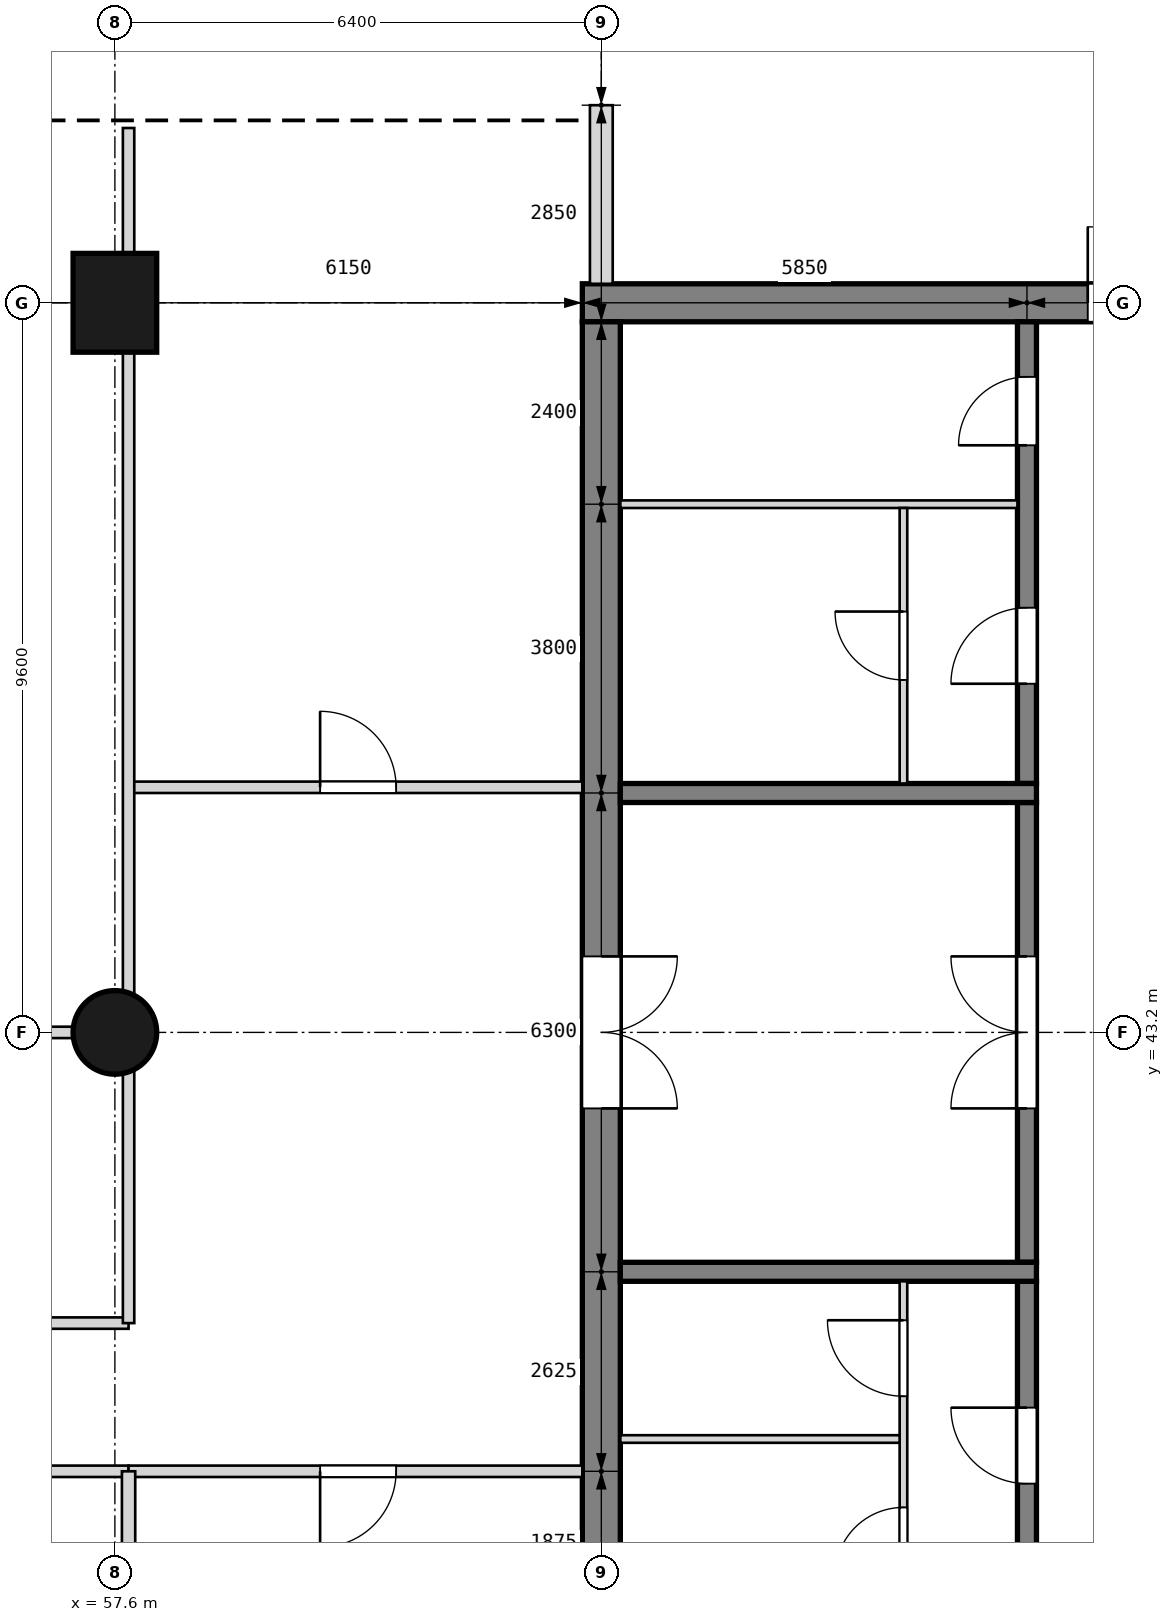
"""IFC4 building model, lengths in metres.
Left out: names, types, materials, properties, quantities, classifications, styles, units other than length and angle.
Written with IfcOpenShell. Run it as: python <this file> out.ifc"""

import sys

from ifc_helpers import new_model, si_unit, direction, frame, frame_2d, origin, origin_2d, place, context, subcontext, project, spatial, rectangle, circle, extrude, element, fill, save


model = new_model("IFC4")
c1 = context("Model", 3, precision=1e-05, world=origin(), true_north=direction((0.0, 1.0)))
c2 = subcontext(c1, "Body", "Model", "MODEL_VIEW")
j1 = project(units=[si_unit("LENGTHUNIT", "METRE"), si_unit("PLANEANGLEUNIT", "RADIAN")], contexts=[c1])
p1 = place(None, origin())
s1 = spatial("IfcSite", under=j1, at=p1, CompositionType="ELEMENT")
p2 = place(p1, origin())
s2 = spatial("IfcBuilding", under=s1, at=p2, CompositionType="ELEMENT")
p3 = place(p2, frame((0.0, 0.0, 8.4)))
s3 = spatial("IfcBuildingStorey", under=s2, at=p3, CompositionType="ELEMENT", Elevation=8.4)
p4 = place(p3, frame((63.75, 52.8, 0.0), z_axis=(0.0, 0.0, 1.0), x_axis=(1.0, 0.0, 0.0)))
e1 = element("IfcWall", 1, at=p4, inside=s3, PredefinedType="SHEAR", context=c2, shape_type="SweptSolid", body=[
    extrude(rectangle(XDim=13.3, YDim=0.5, at=frame_2d((6.65, 0.0))), origin(), (0.0, 0.0, 1.0), 4.5),
])
p5 = place(p4, frame((11.05, 0.0, 1.0)))
e2 = element("IfcOpeningElement", 2, at=p5, cuts=e1, PredefinedType="OPENING", context=c2, shape_type="SweptSolid", body=[
    extrude(rectangle(XDim=0.4, YDim=2.0, at=frame_2d((0.2, 1.0))), frame((0.0, 0.26, 0.0), z_axis=(0.0, -1.0, 0.0), x_axis=(1.0, 0.0, 0.0)), (0.0, 0.0, 1.0), 0.52),
])
p6 = place(p4, frame((6.65, 0.0, 0.0)))
e3 = element("IfcOpeningElement", 3, at=p6, cuts=e1, PredefinedType="OPENING", context=c2, shape_type="SweptSolid", body=[
    extrude(rectangle(XDim=2.0, YDim=2.1, at=frame_2d((1.0, 1.05))), frame((0.0, 0.26, 0.0), z_axis=(0.0, -1.0, 0.0), x_axis=(1.0, 0.0, 0.0)), (0.0, 0.0, 1.0), 0.52),
])
p7 = place(p3, frame((64.0, 33.85, 0.0), z_axis=(0.0, 0.0, 1.0), x_axis=(0.0, 1.0, 0.0)))
e4 = element("IfcWall", 4, at=p7, inside=s3, PredefinedType="SHEAR", context=c2, shape_type="SweptSolid", body=[
    extrude(rectangle(XDim=18.7, YDim=0.5, at=frame_2d((9.35, 0.0))), origin(), (0.0, 0.0, 1.0), 4.5),
])
p8 = place(p7, frame((8.35, 0.0, 0.0)))
e5 = element("IfcOpeningElement", 5, at=p8, cuts=e4, PredefinedType="OPENING", context=c2, shape_type="SweptSolid", body=[
    extrude(rectangle(XDim=2.0, YDim=2.1, at=frame_2d((1.0, 1.05))), frame((0.0, 0.26, 0.0), z_axis=(0.0, -1.0, 0.0), x_axis=(1.0, 0.0, 0.0)), (0.0, 0.0, 1.0), 0.52),
])
p9 = place(p3, frame((57.6, 43.2, 0.0), z_axis=(0.0, 0.0, 1.0), x_axis=(1.0, 0.0, 0.0)))
e6 = element("IfcColumn", 6, at=p9, inside=s3, PredefinedType="COLUMN", context=c2, shape_type="SweptSolid", body=[
    extrude(circle(Radius=0.55, at=origin_2d()), origin(), (0.0, 0.0, 1.0), 4.5),
])
p10 = place(p3, frame((57.6, 52.8, 0.0), z_axis=(0.0, 0.0, 1.0), x_axis=(1.0, 0.0, 0.0)))
e7 = element("IfcColumn", 7, at=p10, inside=s3, PredefinedType="COLUMN", context=c2, shape_type="SweptSolid", body=[
    extrude(rectangle(XDim=1.1, YDim=1.3, at=origin_2d()), origin(), (0.0, 0.0, 1.0), 4.5),
])
p11 = place(p3, frame((64.0, 53.05, 0.0), z_axis=(0.0, 0.0, 1.0), x_axis=(0.0, 1.0, 0.0)))
e8 = element("IfcWall", 8, at=p11, inside=s3, PredefinedType="SOLIDWALL", context=c2, shape_type="SweptSolid", body=[
    extrude(rectangle(XDim=2.35, YDim=0.3, at=frame_2d((1.175, 0.0))), origin(), (0.0, 0.0, 1.0), 3.48),
])
p12 = place(p3, frame((69.6, 33.85, 0.0), z_axis=(0.0, 0.0, 1.0), x_axis=(0.0, 1.0, 0.0)))
e9 = element("IfcWall", 9, at=p12, inside=s3, PredefinedType="SOLIDWALL", context=c2, shape_type="SweptSolid", body=[
    extrude(rectangle(XDim=6.075, YDim=0.25, at=frame_2d((3.038, 0.0))), origin(), (0.0, 0.0, 1.0), 4.2),
])
p13 = place(p12, frame((0.425, 0.0, 0.0)))
e10 = element("IfcOpeningElement", 10, at=p13, cuts=e9, PredefinedType="OPENING", context=c2, shape_type="SweptSolid", body=[
    extrude(rectangle(XDim=0.8, YDim=2.1, at=frame_2d((0.4, 1.05))), frame((0.0, 0.135, 0.0), z_axis=(0.0, -1.0, 0.0), x_axis=(1.0, 0.0, 0.0)), (0.0, 0.0, 1.0), 0.27),
])
p14 = place(p12, frame((3.413, 0.0, 0.0)))
e11 = element("IfcOpeningElement", 11, at=p14, cuts=e9, PredefinedType="OPENING", context=c2, shape_type="SweptSolid", body=[
    extrude(rectangle(XDim=1.0, YDim=2.1, at=frame_2d((0.5, 1.05))), frame((0.0, 0.135, 0.0), z_axis=(0.0, -1.0, 0.0), x_axis=(1.0, 0.0, 0.0)), (0.0, 0.0, 1.0), 0.27),
])
p15 = place(p3, frame((69.6, 40.175, 0.0), z_axis=(0.0, 0.0, 1.0), x_axis=(0.0, 1.0, 0.0)))
e12 = element("IfcWall", 12, at=p15, inside=s3, PredefinedType="SOLIDWALL", context=c2, shape_type="SweptSolid", body=[
    extrude(rectangle(XDim=6.05, YDim=0.25, at=frame_2d((3.025, 0.0))), origin(), (0.0, 0.0, 1.0), 4.2),
])
p16 = place(p15, frame((2.025, 0.0, 0.0)))
e13 = element("IfcOpeningElement", 13, at=p16, cuts=e12, PredefinedType="OPENING", context=c2, shape_type="SweptSolid", body=[
    extrude(rectangle(XDim=2.0, YDim=2.1, at=frame_2d((1.0, 1.05))), frame((0.0, 0.135, 0.0), z_axis=(0.0, -1.0, 0.0), x_axis=(1.0, 0.0, 0.0)), (0.0, 0.0, 1.0), 0.27),
])
p17 = place(p3, frame((69.6, 46.475, 0.0), z_axis=(0.0, 0.0, 1.0), x_axis=(0.0, 1.0, 0.0)))
e14 = element("IfcWall", 14, at=p17, inside=s3, PredefinedType="SOLIDWALL", context=c2, shape_type="SweptSolid", body=[
    extrude(rectangle(XDim=6.075, YDim=0.25, at=frame_2d((3.038, 0.0))), origin(), (0.0, 0.0, 1.0), 4.2),
])
p18 = place(p17, frame((1.312, 0.0, 0.0)))
e15 = element("IfcOpeningElement", 15, at=p18, cuts=e14, PredefinedType="OPENING", context=c2, shape_type="SweptSolid", body=[
    extrude(rectangle(XDim=1.0, YDim=2.1, at=frame_2d((0.5, 1.05))), frame((0.0, 0.135, 0.0), z_axis=(0.0, -1.0, 0.0), x_axis=(1.0, 0.0, 0.0)), (0.0, 0.0, 1.0), 0.27),
])
p19 = place(p17, frame((4.45, 0.0, 0.0)))
e16 = element("IfcOpeningElement", 16, at=p19, cuts=e14, PredefinedType="OPENING", context=c2, shape_type="SweptSolid", body=[
    extrude(rectangle(XDim=0.9, YDim=2.1, at=frame_2d((0.45, 1.05))), frame((0.0, 0.135, 0.0), z_axis=(0.0, -1.0, 0.0), x_axis=(1.0, 0.0, 0.0)), (0.0, 0.0, 1.0), 0.27),
])
for number, where, z_axis, x_axis in (
    (17, (69.725, 40.05, 0.0), (0.0, 0.0, 1.0), (-1.0, 0.0, 0.0)),
    (18, (69.725, 46.35, 0.0), (0.0, 0.0, 1.0), (-1.0, 0.0, 0.0)),
):
    element("IfcWall", number, at=place(p3, frame(where, z_axis=z_axis, x_axis=x_axis)), inside=s3, PredefinedType="SOLIDWALL", context=c2, shape_type="SweptSolid", body=[
        extrude(rectangle(XDim=5.475, YDim=0.25, at=frame_2d((2.738, 0.0))), origin(), (0.0, 0.0, 1.0), 4.2),
    ])
p20 = place(p3, frame((67.975, 35.6, 0.0), z_axis=(0.0, 0.0, 1.0), x_axis=(0.0, 1.0, 0.0)))
e19 = element("IfcWall", 19, at=p20, inside=s3, PredefinedType="PARTITIONING", context=c2, shape_type="SweptSolid", body=[
    extrude(rectangle(XDim=4.325, YDim=0.1, at=frame_2d((2.163, 0.0))), origin(), (0.0, 0.0, 1.0), 4.2),
])
p21 = place(p20, frame((0.45, 0.0, 0.0)))
e20 = element("IfcOpeningElement", 20, at=p21, cuts=e19, PredefinedType="OPENING", context=c2, shape_type="SweptSolid", body=[
    extrude(rectangle(XDim=0.9, YDim=2.1, at=frame_2d((0.45, 1.05))), frame((0.0, 0.06, 0.0), z_axis=(0.0, -1.0, 0.0), x_axis=(1.0, 0.0, 0.0)), (0.0, 0.0, 1.0), 0.12),
])
p22 = place(p20, frame((2.812, 0.0, 0.0)))
e21 = element("IfcOpeningElement", 21, at=p22, cuts=e19, PredefinedType="OPENING", context=c2, shape_type="SweptSolid", body=[
    extrude(rectangle(XDim=1.0, YDim=2.1, at=frame_2d((0.5, 1.05))), frame((0.0, 0.06, 0.0), z_axis=(0.0, -1.0, 0.0), x_axis=(1.0, 0.0, 0.0)), (0.0, 0.0, 1.0), 0.12),
])
p23 = place(p3, frame((67.925, 37.85, 0.0), z_axis=(0.0, 0.0, 1.0), x_axis=(-1.0, 0.0, 0.0)))
e22 = element("IfcWall", 22, at=p23, inside=s3, PredefinedType="PARTITIONING", context=c2, shape_type="SweptSolid", body=[
    extrude(rectangle(XDim=3.675, YDim=0.1, at=frame_2d((1.837, 0.0))), origin(), (0.0, 0.0, 1.0), 4.2),
])
p24 = place(p3, frame((69.475, 50.15, 0.0), z_axis=(0.0, 0.0, 1.0), x_axis=(-1.0, 0.0, 0.0)))
e23 = element("IfcWall", 23, at=p24, inside=s3, PredefinedType="PARTITIONING", context=c2, shape_type="SweptSolid", body=[
    extrude(rectangle(XDim=5.225, YDim=0.1, at=frame_2d((2.613, 0.0))), origin(), (0.0, 0.0, 1.0), 4.2),
])
p25 = place(p3, frame((67.975, 46.475, 0.0), z_axis=(0.0, 0.0, 1.0), x_axis=(0.0, 1.0, 0.0)))
e24 = element("IfcWall", 24, at=p25, inside=s3, PredefinedType="PARTITIONING", context=c2, shape_type="SweptSolid", body=[
    extrude(rectangle(XDim=3.625, YDim=0.1, at=frame_2d((1.812, 0.0))), origin(), (0.0, 0.0, 1.0), 4.2),
])
p26 = place(p25, frame((1.363, 0.0, 0.0)))
e25 = element("IfcOpeningElement", 25, at=p26, cuts=e24, PredefinedType="OPENING", context=c2, shape_type="SweptSolid", body=[
    extrude(rectangle(XDim=0.9, YDim=2.1, at=frame_2d((0.45, 1.05))), frame((0.0, 0.06, 0.0), z_axis=(0.0, -1.0, 0.0), x_axis=(1.0, 0.0, 0.0)), (0.0, 0.0, 1.0), 0.12),
])
p27 = place(p3, frame((51.38, 37.425, 0.0), z_axis=(0.0, 0.0, 1.0), x_axis=(1.0, 0.0, 0.0)))
e26 = element("IfcWall", 26, at=p27, inside=s3, PredefinedType="PARTITIONING", context=c2, shape_type="SweptSolid", body=[
    extrude(rectangle(XDim=6.4, YDim=0.15, at=frame_2d((3.2, 0.0))), origin(), (0.0, 0.0, 1.0), 4.28),
])
p28 = place(p27, frame((2.72, 0.0, 0.0)))
e27 = element("IfcOpeningElement", 27, at=p28, cuts=e26, PredefinedType="OPENING", context=c2, shape_type="SweptSolid", body=[
    extrude(rectangle(XDim=1.0, YDim=2.1, at=frame_2d((0.5, 1.05))), frame((0.0, 0.085, 0.0), z_axis=(0.0, -1.0, 0.0), x_axis=(1.0, 0.0, 0.0)), (0.0, 0.0, 1.0), 0.17),
])
p29 = place(p3, frame((57.78, 37.425, 0.0), z_axis=(0.0, 0.0, 1.0), x_axis=(1.0, 0.0, 0.0)))
e28 = element("IfcWall", 28, at=p29, inside=s3, PredefinedType="PARTITIONING", context=c2, shape_type="SweptSolid", body=[
    extrude(rectangle(XDim=5.97, YDim=0.15, at=frame_2d((2.985, 0.0))), origin(), (0.0, 0.0, 1.0), 4.28),
])
p30 = place(p29, frame((2.52, 0.0, 0.0)))
e29 = element("IfcOpeningElement", 29, at=p30, cuts=e28, PredefinedType="OPENING", context=c2, shape_type="SweptSolid", body=[
    extrude(rectangle(XDim=1.0, YDim=2.1, at=frame_2d((0.5, 1.05))), frame((0.0, 0.085, 0.0), z_axis=(0.0, -1.0, 0.0), x_axis=(1.0, 0.0, 0.0)), (0.0, 0.0, 1.0), 0.17),
])
p31 = place(p3, frame((57.78, 34.23, 0.0), z_axis=(0.0, 0.0, 1.0), x_axis=(0.0, 1.0, 0.0)))
e30 = element("IfcWall", 30, at=p31, inside=s3, PredefinedType="PARTITIONING", context=c2, shape_type="SweptSolid", body=[
    extrude(rectangle(XDim=3.195, YDim=0.175, at=frame_2d((1.598, 0.0))), origin(), (0.0, 0.0, 1.0), 3.38),
])
p32 = place(p3, frame((31.82, 39.375, 0.0), z_axis=(0.0, 0.0, 1.0), x_axis=(1.0, 0.0, 0.0)))
e31 = element("IfcWall", 31, at=p32, inside=s3, PredefinedType="PARTITIONING", context=c2, shape_type="SweptSolid", body=[
    extrude(rectangle(XDim=25.96, YDim=0.15, at=frame_2d((12.98, 0.0))), origin(), (0.0, 0.0, 1.0), 4.28),
])
p33 = place(p32, frame((5.63, 0.0, 0.0)))
e32 = element("IfcOpeningElement", 32, at=p33, cuts=e31, PredefinedType="OPENING", context=c2, shape_type="SweptSolid", body=[
    extrude(rectangle(XDim=1.8, YDim=2.1, at=frame_2d((0.9, 1.05))), frame((0.0, 0.085, 0.0), z_axis=(0.0, -1.0, 0.0), x_axis=(1.0, 0.0, 0.0)), (0.0, 0.0, 1.0), 0.17),
])
p34 = place(p32, frame((18.53, 0.0, 0.0)))
e33 = element("IfcOpeningElement", 33, at=p34, cuts=e31, PredefinedType="OPENING", context=c2, shape_type="SweptSolid", body=[
    extrude(rectangle(XDim=1.8, YDim=2.1, at=frame_2d((0.9, 1.05))), frame((0.0, 0.085, 0.0), z_axis=(0.0, -1.0, 0.0), x_axis=(1.0, 0.0, 0.0)), (0.0, 0.0, 1.0), 0.17),
])
p35 = place(p3, frame((31.82, 43.2, 0.0), z_axis=(0.0, 0.0, 1.0), x_axis=(1.0, 0.0, 0.0)))
e34 = element("IfcWall", 34, at=p35, inside=s3, PredefinedType="PARTITIONING", context=c2, shape_type="SweptSolid", body=[
    extrude(rectangle(XDim=25.96, YDim=0.15, at=frame_2d((12.98, 0.0))), origin(), (0.0, 0.0, 1.0), 3.48),
])
p36 = place(p35, frame((3.175, 0.0, 0.0)))
e35 = element("IfcOpeningElement", 35, at=p36, cuts=e34, PredefinedType="OPENING", context=c2, shape_type="SweptSolid", body=[
    extrude(rectangle(XDim=1.8, YDim=2.1, at=frame_2d((0.9, 1.05))), frame((0.0, 0.085, 0.0), z_axis=(0.0, -1.0, 0.0), x_axis=(1.0, 0.0, 0.0)), (0.0, 0.0, 1.0), 0.17),
])
p37 = place(p35, frame((10.325, 0.0, 0.0)))
e36 = element("IfcOpeningElement", 36, at=p37, cuts=e34, PredefinedType="OPENING", context=c2, shape_type="SweptSolid", body=[
    extrude(rectangle(XDim=1.8, YDim=2.1, at=frame_2d((0.9, 1.05))), frame((0.0, 0.085, 0.0), z_axis=(0.0, -1.0, 0.0), x_axis=(1.0, 0.0, 0.0)), (0.0, 0.0, 1.0), 0.17),
])
p38 = place(p35, frame((17.518, 0.0, 0.0)))
e37 = element("IfcOpeningElement", 37, at=p38, cuts=e34, PredefinedType="OPENING", context=c2, shape_type="SweptSolid", body=[
    extrude(rectangle(XDim=1.0, YDim=2.1, at=frame_2d((0.5, 1.05))), frame((0.0, 0.085, 0.0), z_axis=(0.0, -1.0, 0.0), x_axis=(1.0, 0.0, 0.0)), (0.0, 0.0, 1.0), 0.17),
])
p39 = place(p35, frame((22.607, 0.0, 0.0)))
e38 = element("IfcOpeningElement", 38, at=p39, cuts=e34, PredefinedType="OPENING", context=c2, shape_type="SweptSolid", body=[
    extrude(rectangle(XDim=1.8, YDim=2.1, at=frame_2d((0.9, 1.05))), frame((0.0, 0.085, 0.0), z_axis=(0.0, -1.0, 0.0), x_axis=(1.0, 0.0, 0.0)), (0.0, 0.0, 1.0), 0.17),
])
p40 = place(p3, frame((57.78, 46.425, 0.0), z_axis=(0.0, 0.0, 1.0), x_axis=(1.0, 0.0, 0.0)))
e39 = element("IfcWall", 39, at=p40, inside=s3, PredefinedType="PARTITIONING", context=c2, shape_type="SweptSolid", body=[
    extrude(rectangle(XDim=5.97, YDim=0.15, at=frame_2d((2.985, 0.0))), origin(), (0.0, 0.0, 1.0), 4.28),
])
p41 = place(p40, frame((2.52, 0.0, 0.0)))
e40 = element("IfcOpeningElement", 40, at=p41, cuts=e39, PredefinedType="OPENING", context=c2, shape_type="SweptSolid", body=[
    extrude(rectangle(XDim=1.0, YDim=2.1, at=frame_2d((0.5, 1.05))), frame((0.0, 0.085, 0.0), z_axis=(0.0, -1.0, 0.0), x_axis=(1.0, 0.0, 0.0)), (0.0, 0.0, 1.0), 0.17),
])
p42 = place(p3, frame((57.78, 39.375, 0.0), z_axis=(0.0, 0.0, 1.0), x_axis=(0.0, 1.0, 0.0)))
e41 = element("IfcWall", 41, at=p42, inside=s3, PredefinedType="PARTITIONING", context=c2, shape_type="SweptSolid", body=[
    extrude(rectangle(XDim=3.325, YDim=0.15, at=frame_2d((1.663, 0.0))), origin(), (0.0, 0.0, 1.0), 3.38),
])
p43 = place(p3, frame((57.78, 43.7, 0.0), z_axis=(0.0, 0.0, 1.0), x_axis=(0.0, 1.0, 0.0)))
e42 = element("IfcWall", 42, at=p43, inside=s3, PredefinedType="PARTITIONING", context=c2, shape_type="SweptSolid", body=[
    extrude(rectangle(XDim=8.47, YDim=0.15, at=frame_2d((4.235, 0.0))), origin(), (0.0, 0.0, 1.0), 3.38),
])
p44 = place(p3, frame((57.78, 53.43, 0.0), z_axis=(0.0, 0.0, 1.0), x_axis=(0.0, 1.0, 0.0)))
e43 = element("IfcWall", 43, at=p44, inside=s3, PredefinedType="PARTITIONING", context=c2, shape_type="SweptSolid", body=[
    extrude(rectangle(XDim=1.67, YDim=0.15, at=frame_2d((0.835, 0.0))), origin(), (0.0, 0.0, 1.0), 3.38),
])
p45 = place(p16, origin())
e44 = element("IfcDoor", 44, at=p45, inside=s3, OperationType="DOUBLE_DOOR_SINGLE_SWING", PredefinedType="DOOR", context=c2, shape_type="SweptSolid", body=[
    extrude(rectangle(XDim=2.0, YDim=2.1, at=frame_2d((1.0, 1.05))), frame((0.0, 0.025, 0.0), z_axis=(0.0, -1.0, 0.0), x_axis=(1.0, 0.0, 0.0)), (0.0, 0.0, 1.0), 0.05),
])
fill(e13, e44)
p46 = place(p8, frame((2.0, 0.0, 0.0), z_axis=(0.0, 0.0, 1.0), x_axis=(-1.0, 0.0, 0.0)))
e45 = element("IfcDoor", 45, at=p46, inside=s3, OperationType="DOUBLE_DOOR_SINGLE_SWING", PredefinedType="DOOR", context=c2, shape_type="SweptSolid", body=[
    extrude(rectangle(XDim=2.0, YDim=2.1, at=frame_2d((1.0, 1.05))), frame((0.0, 0.025, 0.0), z_axis=(0.0, -1.0, 0.0), x_axis=(1.0, 0.0, 0.0)), (0.0, 0.0, 1.0), 0.05),
])
fill(e5, e45)
p47 = place(p14, origin())
e46 = element("IfcDoor", 46, at=p47, inside=s3, OperationType="SINGLE_SWING_RIGHT", PredefinedType="DOOR", context=c2, shape_type="SweptSolid", body=[
    extrude(rectangle(XDim=1.0, YDim=2.1, at=frame_2d((0.5, 1.05))), frame((0.0, 0.025, 0.0), z_axis=(0.0, -1.0, 0.0), x_axis=(1.0, 0.0, 0.0)), (0.0, 0.0, 1.0), 0.05),
])
fill(e11, e46)
p48 = place(p21, origin())
e47 = element("IfcDoor", 47, at=p48, inside=s3, OperationType="SINGLE_SWING_LEFT", PredefinedType="DOOR", context=c2, shape_type="SweptSolid", body=[
    extrude(rectangle(XDim=0.9, YDim=2.1, at=frame_2d((0.45, 1.05))), frame((0.0, 0.025, 0.0), z_axis=(0.0, -1.0, 0.0), x_axis=(1.0, 0.0, 0.0)), (0.0, 0.0, 1.0), 0.05),
])
fill(e20, e47)
p49 = place(p22, origin())
e48 = element("IfcDoor", 48, at=p49, inside=s3, OperationType="SINGLE_SWING_RIGHT", PredefinedType="DOOR", context=c2, shape_type="SweptSolid", body=[
    extrude(rectangle(XDim=1.0, YDim=2.1, at=frame_2d((0.5, 1.05))), frame((0.0, 0.025, 0.0), z_axis=(0.0, -1.0, 0.0), x_axis=(1.0, 0.0, 0.0)), (0.0, 0.0, 1.0), 0.05),
])
fill(e21, e48)
p50 = place(p18, origin())
e49 = element("IfcDoor", 49, at=p50, inside=s3, OperationType="SINGLE_SWING_LEFT", PredefinedType="DOOR", context=c2, shape_type="SweptSolid", body=[
    extrude(rectangle(XDim=1.0, YDim=2.1, at=frame_2d((0.5, 1.05))), frame((0.0, 0.025, 0.0), z_axis=(0.0, -1.0, 0.0), x_axis=(1.0, 0.0, 0.0)), (0.0, 0.0, 1.0), 0.05),
])
fill(e15, e49)
p51 = place(p26, origin())
e50 = element("IfcDoor", 50, at=p51, inside=s3, OperationType="SINGLE_SWING_RIGHT", PredefinedType="DOOR", context=c2, shape_type="SweptSolid", body=[
    extrude(rectangle(XDim=0.9, YDim=2.1, at=frame_2d((0.45, 1.05))), frame((0.0, 0.025, 0.0), z_axis=(0.0, -1.0, 0.0), x_axis=(1.0, 0.0, 0.0)), (0.0, 0.0, 1.0), 0.05),
])
fill(e25, e50)
p52 = place(p19, origin())
e51 = element("IfcDoor", 51, at=p52, inside=s3, OperationType="SINGLE_SWING_LEFT", PredefinedType="DOOR", context=c2, shape_type="SweptSolid", body=[
    extrude(rectangle(XDim=0.9, YDim=2.1, at=frame_2d((0.45, 1.05))), frame((0.0, 0.025, 0.0), z_axis=(0.0, -1.0, 0.0), x_axis=(1.0, 0.0, 0.0)), (0.0, 0.0, 1.0), 0.05),
])
fill(e16, e51)
p53 = place(p6, origin())
e52 = element("IfcDoor", 52, at=p53, inside=s3, OperationType="DOUBLE_DOOR_SINGLE_SWING", PredefinedType="DOOR", context=c2, shape_type="SweptSolid", body=[
    extrude(rectangle(XDim=2.0, YDim=2.1, at=frame_2d((1.0, 1.05))), frame((0.0, 0.025, 0.0), z_axis=(0.0, -1.0, 0.0), x_axis=(1.0, 0.0, 0.0)), (0.0, 0.0, 1.0), 0.05),
])
fill(e3, e52)
p54 = place(p30, frame((1.0, 0.0, 0.0), z_axis=(0.0, 0.0, 1.0), x_axis=(-1.0, 0.0, 0.0)))
e53 = element("IfcDoor", 53, at=p54, inside=s3, OperationType="SINGLE_SWING_RIGHT", PredefinedType="DOOR", context=c2, shape_type="SweptSolid", body=[
    extrude(rectangle(XDim=1.0, YDim=2.1, at=frame_2d((0.5, 1.05))), frame((0.0, 0.025, 0.0), z_axis=(0.0, -1.0, 0.0), x_axis=(1.0, 0.0, 0.0)), (0.0, 0.0, 1.0), 0.05),
])
fill(e29, e53)
p55 = place(p41, origin())
e54 = element("IfcDoor", 54, at=p55, inside=s3, OperationType="SINGLE_SWING_LEFT", PredefinedType="DOOR", context=c2, shape_type="SweptSolid", body=[
    extrude(rectangle(XDim=1.0, YDim=2.1, at=frame_2d((0.5, 1.05))), frame((0.0, 0.025, 0.0), z_axis=(0.0, -1.0, 0.0), x_axis=(1.0, 0.0, 0.0)), (0.0, 0.0, 1.0), 0.05),
])
fill(e40, e54)
save(model, sys.argv[1])
